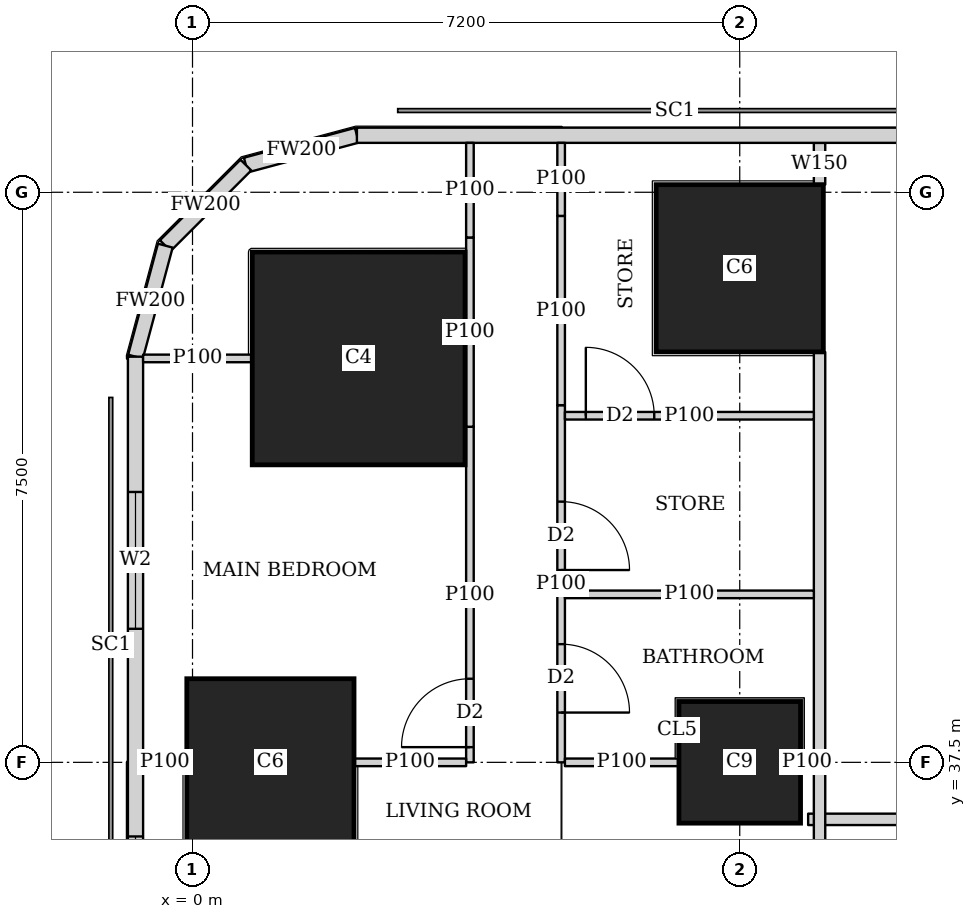
"""IFC4 building model, lengths in metres.
Left out: names, types, materials, properties, quantities, classifications, styles, units other than length and angle.
Written with IfcOpenShell. Run it as: python <this file> out.ifc"""

import sys

from ifc_helpers import new_model, si_unit, direction, frame, frame_2d, origin, origin_2d, place, context, subcontext, project, spatial, rectangle, extrude, element, fill, save


model = new_model("IFC4")
c1 = context("Model", 3, precision=1e-05, world=origin(), true_north=direction((0.0, 1.0)))
c2 = subcontext(c1, "Body", "Model", "MODEL_VIEW")
j1 = project(units=[si_unit("LENGTHUNIT", "METRE"), si_unit("PLANEANGLEUNIT", "RADIAN")], contexts=[c1])
p1 = place(None, origin())
s1 = spatial("IfcSite", under=j1, at=p1, CompositionType="ELEMENT")
p2 = place(p1, origin())
s2 = spatial("IfcBuilding", under=s1, at=p2, CompositionType="ELEMENT")
p3 = place(p2, frame((0.0, 0.0, 100.4)))
s3 = spatial("IfcBuildingStorey", under=s2, at=p3, CompositionType="ELEMENT", Elevation=100.4)
p4 = place(p3, frame((1.025, 37.5, 0.0), z_axis=(0.0, 0.0, 1.0), x_axis=(1.0, 0.0, 0.0)))
e1 = element("IfcColumn", 1, at=p4, inside=s3, PredefinedType="COLUMN", context=c2, shape_type="SweptSolid", body=[
    extrude(rectangle(XDim=2.2, YDim=2.2, at=origin_2d()), origin(), (0.0, 0.0, 1.0), 3.75),
])
p5 = place(p3, frame((7.2, 37.5, 0.0), z_axis=(0.0, 0.0, 1.0), x_axis=(1.0, 0.0, 0.0)))
e2 = element("IfcColumn", 2, at=p5, inside=s3, PredefinedType="COLUMN", context=c2, shape_type="SweptSolid", body=[
    extrude(rectangle(XDim=1.6, YDim=1.6, at=origin_2d()), origin(), (0.0, 0.0, 1.0), 3.75),
])
p6 = place(p3, frame((2.186, 42.814, 0.0), z_axis=(0.0, 0.0, 1.0), x_axis=(1.0, 0.0, 0.0)))
e3 = element("IfcColumn", 3, at=p6, inside=s3, PredefinedType="COLUMN", context=c2, shape_type="SweptSolid", body=[
    extrude(rectangle(XDim=2.8, YDim=2.8, at=origin_2d()), origin(), (0.0, 0.0, 1.0), 3.75),
])
p7 = place(p3, frame((7.2, 44.0, 0.0), z_axis=(0.0, 0.0, 1.0), x_axis=(1.0, 0.0, 0.0)))
e4 = element("IfcColumn", 4, at=p7, inside=s3, PredefinedType="COLUMN", context=c2, shape_type="SweptSolid", body=[
    extrude(rectangle(XDim=2.2, YDim=2.2, at=origin_2d()), origin(), (0.0, 0.0, 1.0), 3.75),
])
p8 = place(p3, frame((40.106, 45.75, 0.0), z_axis=(0.0, 0.0, 1.0), x_axis=(-1.0, 0.0, 0.0)))
e5 = element("IfcWall", 5, at=p8, inside=s3, PredefinedType="SOLIDWALL", context=c2, shape_type="SweptSolid", body=[
    extrude(rectangle(XDim=37.943, YDim=0.2, at=frame_2d((18.971, 0.0))), origin(), (0.0, 0.0, 1.0), 3.5),
])
p9 = place(p8, frame((8.606, 0.0, 0.9)))
e6 = element("IfcOpeningElement", 6, at=p9, cuts=e5, PredefinedType="OPENING", context=c2, shape_type="SweptSolid", body=[
    extrude(rectangle(XDim=1.8, YDim=1.5, at=frame_2d((0.9, 0.75))), frame((0.0, 0.11, 0.0), z_axis=(0.0, -1.0, 0.0), x_axis=(1.0, 0.0, 0.0)), (0.0, 0.0, 1.0), 0.22),
])
p10 = place(p8, frame((12.206, 0.0, 0.9)))
e7 = element("IfcOpeningElement", 7, at=p10, cuts=e5, PredefinedType="OPENING", context=c2, shape_type="SweptSolid", body=[
    extrude(rectangle(XDim=1.8, YDim=1.5, at=frame_2d((0.9, 0.75))), frame((0.0, 0.11, 0.0), z_axis=(0.0, -1.0, 0.0), x_axis=(1.0, 0.0, 0.0)), (0.0, 0.0, 1.0), 0.22),
])
p11 = place(p8, frame((15.806, 0.0, 0.9)))
e8 = element("IfcOpeningElement", 8, at=p11, cuts=e5, PredefinedType="OPENING", context=c2, shape_type="SweptSolid", body=[
    extrude(rectangle(XDim=1.8, YDim=1.5, at=frame_2d((0.9, 0.75))), frame((0.0, 0.11, 0.0), z_axis=(0.0, -1.0, 0.0), x_axis=(1.0, 0.0, 0.0)), (0.0, 0.0, 1.0), 0.22),
])
p12 = place(p8, frame((19.406, 0.0, 0.9)))
e9 = element("IfcOpeningElement", 9, at=p12, cuts=e5, PredefinedType="OPENING", context=c2, shape_type="SweptSolid", body=[
    extrude(rectangle(XDim=1.8, YDim=1.5, at=frame_2d((0.9, 0.75))), frame((0.0, 0.11, 0.0), z_axis=(0.0, -1.0, 0.0), x_axis=(1.0, 0.0, 0.0)), (0.0, 0.0, 1.0), 0.22),
])
p13 = place(p8, frame((23.006, 0.0, 0.9)))
e10 = element("IfcOpeningElement", 10, at=p13, cuts=e5, PredefinedType="OPENING", context=c2, shape_type="SweptSolid", body=[
    extrude(rectangle(XDim=1.8, YDim=1.5, at=frame_2d((0.9, 0.75))), frame((0.0, 0.11, 0.0), z_axis=(0.0, -1.0, 0.0), x_axis=(1.0, 0.0, 0.0)), (0.0, 0.0, 1.0), 0.22),
])
p14 = place(p8, frame((26.606, 0.0, 0.9)))
e11 = element("IfcOpeningElement", 11, at=p14, cuts=e5, PredefinedType="OPENING", context=c2, shape_type="SweptSolid", body=[
    extrude(rectangle(XDim=1.8, YDim=1.5, at=frame_2d((0.9, 0.75))), frame((0.0, 0.11, 0.0), z_axis=(0.0, -1.0, 0.0), x_axis=(1.0, 0.0, 0.0)), (0.0, 0.0, 1.0), 0.22),
])
p15 = place(p3, frame((2.163, 45.75, 0.0), z_axis=(0.0, 0.0, 1.0), x_axis=(-0.965832000415, -0.259168954497, 0.0)))
e12 = element("IfcWall", 12, at=p15, inside=s3, PredefinedType="SOLIDWALL", context=c2, shape_type="SweptSolid", body=[
    extrude(rectangle(XDim=1.513, YDim=0.2, at=frame_2d((0.756, 0.0))), origin(), (0.0, 0.0, 1.0), 3.5),
])
p16 = place(p3, frame((0.702, 45.358, 0.0), z_axis=(0.0, 0.0, 1.0), x_axis=(-0.707106781187, -0.707106781187, 0.0)))
e13 = element("IfcWall", 13, at=p16, inside=s3, PredefinedType="SOLIDWALL", context=c2, shape_type="SweptSolid", body=[
    extrude(rectangle(XDim=1.499, YDim=0.2, at=frame_2d((0.75, 0.0))), origin(), (0.0, 0.0, 1.0), 3.5),
])
p17 = place(p3, frame((-0.358, 44.298, 0.0), z_axis=(0.0, 0.0, 1.0), x_axis=(-0.259168954497, -0.965832000415, 0.0)))
e14 = element("IfcWall", 14, at=p17, inside=s3, PredefinedType="SOLIDWALL", context=c2, shape_type="SweptSolid", body=[
    extrude(rectangle(XDim=1.513, YDim=0.2, at=frame_2d((0.756, 0.0))), origin(), (0.0, 0.0, 1.0), 3.5),
])
p18 = place(p3, frame((-0.75, 42.837, 0.0), z_axis=(0.0, 0.0, 1.0), x_axis=(0.0, -1.0, 0.0)))
e15 = element("IfcWall", 15, at=p18, inside=s3, PredefinedType="SOLIDWALL", context=c2, shape_type="SweptSolid", body=[
    extrude(rectangle(XDim=40.674, YDim=0.2, at=frame_2d((20.337, 0.0))), origin(), (0.0, 0.0, 1.0), 3.5),
])
p19 = place(p18, frame((1.78, 0.0, 0.9)))
e16 = element("IfcOpeningElement", 16, at=p19, cuts=e15, PredefinedType="OPENING", context=c2, shape_type="SweptSolid", body=[
    extrude(rectangle(XDim=1.8, YDim=1.5, at=frame_2d((0.9, 0.75))), frame((0.0, 0.11, 0.0), z_axis=(0.0, -1.0, 0.0), x_axis=(1.0, 0.0, 0.0)), (0.0, 0.0, 1.0), 0.22),
])
p20 = place(p18, frame((6.312, 0.0, 0.9)))
e17 = element("IfcOpeningElement", 17, at=p20, cuts=e15, PredefinedType="OPENING", context=c2, shape_type="SweptSolid", body=[
    extrude(rectangle(XDim=1.8, YDim=1.5, at=frame_2d((0.9, 0.75))), frame((0.0, 0.11, 0.0), z_axis=(0.0, -1.0, 0.0), x_axis=(1.0, 0.0, 0.0)), (0.0, 0.0, 1.0), 0.22),
])
p21 = place(p18, frame((10.062, 0.0, 0.9)))
e18 = element("IfcOpeningElement", 18, at=p21, cuts=e15, PredefinedType="OPENING", context=c2, shape_type="SweptSolid", body=[
    extrude(rectangle(XDim=1.8, YDim=1.5, at=frame_2d((0.9, 0.75))), frame((0.0, 0.11, 0.0), z_axis=(0.0, -1.0, 0.0), x_axis=(1.0, 0.0, 0.0)), (0.0, 0.0, 1.0), 0.22),
])
p22 = place(p18, frame((13.812, 0.0, 0.9)))
e19 = element("IfcOpeningElement", 19, at=p22, cuts=e15, PredefinedType="OPENING", context=c2, shape_type="SweptSolid", body=[
    extrude(rectangle(XDim=1.8, YDim=1.5, at=frame_2d((0.9, 0.75))), frame((0.0, 0.11, 0.0), z_axis=(0.0, -1.0, 0.0), x_axis=(1.0, 0.0, 0.0)), (0.0, 0.0, 1.0), 0.22),
])
p23 = place(p18, frame((17.562, 0.0, 0.9)))
e20 = element("IfcOpeningElement", 20, at=p23, cuts=e15, PredefinedType="OPENING", context=c2, shape_type="SweptSolid", body=[
    extrude(rectangle(XDim=1.8, YDim=1.5, at=frame_2d((0.9, 0.75))), frame((0.0, 0.11, 0.0), z_axis=(0.0, -1.0, 0.0), x_axis=(1.0, 0.0, 0.0)), (0.0, 0.0, 1.0), 0.22),
])
p24 = place(p18, frame((21.312, 0.0, 0.9)))
e21 = element("IfcOpeningElement", 21, at=p24, cuts=e15, PredefinedType="OPENING", context=c2, shape_type="SweptSolid", body=[
    extrude(rectangle(XDim=1.8, YDim=1.5, at=frame_2d((0.9, 0.75))), frame((0.0, 0.11, 0.0), z_axis=(0.0, -1.0, 0.0), x_axis=(1.0, 0.0, 0.0)), (0.0, 0.0, 1.0), 0.22),
])
p25 = place(p18, frame((25.062, 0.0, 0.9)))
e22 = element("IfcOpeningElement", 22, at=p25, cuts=e15, PredefinedType="OPENING", context=c2, shape_type="SweptSolid", body=[
    extrude(rectangle(XDim=1.8, YDim=1.5, at=frame_2d((0.9, 0.75))), frame((0.0, 0.11, 0.0), z_axis=(0.0, -1.0, 0.0), x_axis=(1.0, 0.0, 0.0)), (0.0, 0.0, 1.0), 0.22),
])
p26 = place(p18, frame((28.812, 0.0, 0.9)))
e23 = element("IfcOpeningElement", 23, at=p26, cuts=e15, PredefinedType="OPENING", context=c2, shape_type="SweptSolid", body=[
    extrude(rectangle(XDim=1.8, YDim=1.5, at=frame_2d((0.9, 0.75))), frame((0.0, 0.11, 0.0), z_axis=(0.0, -1.0, 0.0), x_axis=(1.0, 0.0, 0.0)), (0.0, 0.0, 1.0), 0.22),
])
p27 = place(p18, frame((32.562, 0.0, 0.9)))
e24 = element("IfcOpeningElement", 24, at=p27, cuts=e15, PredefinedType="OPENING", context=c2, shape_type="SweptSolid", body=[
    extrude(rectangle(XDim=1.8, YDim=1.5, at=frame_2d((0.9, 0.75))), frame((0.0, 0.11, 0.0), z_axis=(0.0, -1.0, 0.0), x_axis=(1.0, 0.0, 0.0)), (0.0, 0.0, 1.0), 0.22),
])
p28 = place(p18, frame((37.094, 0.0, 0.9)))
e25 = element("IfcOpeningElement", 25, at=p28, cuts=e15, PredefinedType="OPENING", context=c2, shape_type="SweptSolid", body=[
    extrude(rectangle(XDim=1.8, YDim=1.5, at=frame_2d((0.9, 0.75))), frame((0.0, 0.11, 0.0), z_axis=(0.0, -1.0, 0.0), x_axis=(1.0, 0.0, 0.0)), (0.0, 0.0, 1.0), 0.22),
])
p29 = place(p3, frame((8.25, 2.126, 0.0), z_axis=(0.0, 0.0, 1.0), x_axis=(0.0, 1.0, 0.0)))
e26 = element("IfcWall", 26, at=p29, inside=s3, PredefinedType="SOLIDWALL", context=c2, shape_type="SweptSolid", body=[
    extrude(rectangle(XDim=40.773, YDim=0.15, at=frame_2d((20.386, 0.0))), origin(), (0.0, 0.0, 1.0), 3.5),
])
p30 = place(p29, frame((10.286, 0.0, 0.0)))
e27 = element("IfcOpeningElement", 27, at=p30, cuts=e26, PredefinedType="OPENING", context=c2, shape_type="SweptSolid", body=[
    extrude(rectangle(XDim=1.0, YDim=2.1, at=frame_2d((0.5, 1.05))), frame((0.0, 0.085, 0.0), z_axis=(0.0, -1.0, 0.0), x_axis=(1.0, 0.0, 0.0)), (0.0, 0.0, 1.0), 0.17),
])
p31 = place(p29, frame((14.461, 0.0, 0.0)))
e28 = element("IfcOpeningElement", 28, at=p31, cuts=e26, PredefinedType="OPENING", context=c2, shape_type="SweptSolid", body=[
    extrude(rectangle(XDim=1.0, YDim=2.1, at=frame_2d((0.5, 1.05))), frame((0.0, 0.085, 0.0), z_axis=(0.0, -1.0, 0.0), x_axis=(1.0, 0.0, 0.0)), (0.0, 0.0, 1.0), 0.17),
])
p32 = place(p29, frame((25.287, 0.0, 0.0)))
e29 = element("IfcOpeningElement", 29, at=p32, cuts=e26, PredefinedType="OPENING", context=c2, shape_type="SweptSolid", body=[
    extrude(rectangle(XDim=1.0, YDim=2.1, at=frame_2d((0.5, 1.05))), frame((0.0, 0.085, 0.0), z_axis=(0.0, -1.0, 0.0), x_axis=(1.0, 0.0, 0.0)), (0.0, 0.0, 1.0), 0.17),
])
p33 = place(p29, frame((32.787, 0.0, 0.0)))
e30 = element("IfcOpeningElement", 30, at=p33, cuts=e26, PredefinedType="OPENING", context=c2, shape_type="SweptSolid", body=[
    extrude(rectangle(XDim=1.0, YDim=2.1, at=frame_2d((0.5, 1.05))), frame((0.0, 0.085, 0.0), z_axis=(0.0, -1.0, 0.0), x_axis=(1.0, 0.0, 0.0)), (0.0, 0.0, 1.0), 0.17),
])
p34 = place(p3, frame((8.25, 45.101, 0.0), z_axis=(0.0, 0.0, 1.0), x_axis=(0.0, 1.0, 0.0)))
e31 = element("IfcWall", 31, at=p34, inside=s3, PredefinedType="SOLIDWALL", context=c2, shape_type="SweptSolid", body=[
    extrude(rectangle(XDim=0.549, YDim=0.15, at=frame_2d((0.274, 0.0))), origin(), (0.0, 0.0, 1.0), 3.5),
])
p35 = place(p3, frame((8.1, 36.75, 0.0), z_axis=(0.0, 0.0, 1.0), x_axis=(1.0, 0.0, 0.0)))
e32 = element("IfcWall", 32, at=p35, inside=s3, PredefinedType="SOLIDWALL", context=c2, shape_type="SweptSolid", body=[
    extrude(rectangle(XDim=5.499, YDim=0.15, at=frame_2d((2.75, 0.0))), origin(), (0.0, 0.0, 1.0), 3.5),
])
p36 = place(p35, frame((2.725, 0.0, 0.0)))
e33 = element("IfcOpeningElement", 33, at=p36, cuts=e32, PredefinedType="OPENING", context=c2, shape_type="SweptSolid", body=[
    extrude(rectangle(XDim=1.0, YDim=2.1, at=frame_2d((0.5, 1.05))), frame((0.0, 0.085, 0.0), z_axis=(0.0, -1.0, 0.0), x_axis=(1.0, 0.0, 0.0)), (0.0, 0.0, 1.0), 0.17),
])
p37 = place(p3, frame((3.65, 37.5, 0.0), z_axis=(0.0, 0.0, 1.0), x_axis=(0.0, 1.0, 0.0)))
e34 = element("IfcWall", 34, at=p37, inside=s3, PredefinedType="PARTITIONING", context=c2, shape_type="SweptSolid", body=[
    extrude(rectangle(XDim=4.415, YDim=0.1, at=frame_2d((2.208, 0.0))), origin(), (0.0, 0.0, 1.0), 3.5),
])
p38 = place(p37, frame((0.2, 0.0, 0.0)))
e35 = element("IfcOpeningElement", 35, at=p38, cuts=e34, PredefinedType="OPENING", context=c2, shape_type="SweptSolid", body=[
    extrude(rectangle(XDim=0.9, YDim=2.1, at=frame_2d((0.45, 1.05))), frame((0.0, 0.06, 0.0), z_axis=(0.0, -1.0, 0.0), x_axis=(1.0, 0.0, 0.0)), (0.0, 0.0, 1.0), 0.12),
])
p39 = place(p3, frame((3.65, 41.915, 0.0), z_axis=(0.0, 0.0, 1.0), x_axis=(0.0, 1.0, 0.0)))
e36 = element("IfcWall", 36, at=p39, inside=s3, PredefinedType="PARTITIONING", context=c2, shape_type="SweptSolid", body=[
    extrude(rectangle(XDim=2.49, YDim=0.1, at=frame_2d((1.245, 0.0))), origin(), (0.0, 0.0, 1.0), 2.05),
])
p40 = place(p3, frame((3.65, 44.405, 0.0), z_axis=(0.0, 0.0, 1.0), x_axis=(0.0, 1.0, 0.0)))
e37 = element("IfcWall", 37, at=p40, inside=s3, PredefinedType="PARTITIONING", context=c2, shape_type="SweptSolid", body=[
    extrude(rectangle(XDim=1.245, YDim=0.1, at=frame_2d((0.623, 0.0))), origin(), (0.0, 0.0, 1.0), 3.5),
])
p41 = place(p3, frame((4.85, 37.5, 0.0), z_axis=(0.0, 0.0, 1.0), x_axis=(0.0, 1.0, 0.0)))
e38 = element("IfcWall", 38, at=p41, inside=s3, PredefinedType="PARTITIONING", context=c2, shape_type="SweptSolid", body=[
    extrude(rectangle(XDim=4.699, YDim=0.1, at=frame_2d((2.35, 0.0))), origin(), (0.0, 0.0, 1.0), 3.5),
])
p42 = place(p41, frame((0.655, 0.0, 0.0)))
e39 = element("IfcOpeningElement", 39, at=p42, cuts=e38, PredefinedType="OPENING", context=c2, shape_type="SweptSolid", body=[
    extrude(rectangle(XDim=0.9, YDim=2.1, at=frame_2d((0.45, 1.05))), frame((0.0, 0.06, 0.0), z_axis=(0.0, -1.0, 0.0), x_axis=(1.0, 0.0, 0.0)), (0.0, 0.0, 1.0), 0.12),
])
p43 = place(p41, frame((2.53, 0.0, 0.0)))
e40 = element("IfcOpeningElement", 40, at=p43, cuts=e38, PredefinedType="OPENING", context=c2, shape_type="SweptSolid", body=[
    extrude(rectangle(XDim=0.9, YDim=2.1, at=frame_2d((0.45, 1.05))), frame((0.0, 0.06, 0.0), z_axis=(0.0, -1.0, 0.0), x_axis=(1.0, 0.0, 0.0)), (0.0, 0.0, 1.0), 0.12),
])
p44 = place(p3, frame((4.85, 42.199, 0.0), z_axis=(0.0, 0.0, 1.0), x_axis=(0.0, 1.0, 0.0)))
e41 = element("IfcWall", 41, at=p44, inside=s3, PredefinedType="PARTITIONING", context=c2, shape_type="SweptSolid", body=[
    extrude(rectangle(XDim=2.49, YDim=0.1, at=frame_2d((1.245, 0.0))), origin(), (0.0, 0.0, 1.0), 2.05),
])
p45 = place(p3, frame((4.85, 44.689, 0.0), z_axis=(0.0, 0.0, 1.0), x_axis=(0.0, 1.0, 0.0)))
e42 = element("IfcWall", 42, at=p45, inside=s3, PredefinedType="PARTITIONING", context=c2, shape_type="SweptSolid", body=[
    extrude(rectangle(XDim=0.961, YDim=0.1, at=frame_2d((0.48, 0.0))), origin(), (0.0, 0.0, 1.0), 3.5),
])
p46 = place(p3, frame((-0.65, 37.5, 0.0), z_axis=(0.0, 0.0, 1.0), x_axis=(1.0, 0.0, 0.0)))
e43 = element("IfcWall", 43, at=p46, inside=s3, PredefinedType="PARTITIONING", context=c2, shape_type="SweptSolid", body=[
    extrude(rectangle(XDim=0.574, YDim=0.1, at=frame_2d((0.287, 0.0))), origin(), (0.0, 0.0, 1.0), 2.05),
])
p47 = place(p3, frame((2.126, 37.5, 0.0), z_axis=(0.0, 0.0, 1.0), x_axis=(1.0, 0.0, 0.0)))
e44 = element("IfcWall", 44, at=p47, inside=s3, PredefinedType="PARTITIONING", context=c2, shape_type="SweptSolid", body=[
    extrude(rectangle(XDim=1.474, YDim=0.1, at=frame_2d((0.737, 0.0))), origin(), (0.0, 0.0, 1.0), 2.05),
])
p48 = place(p3, frame((-0.65, 42.814, 0.0), z_axis=(0.0, 0.0, 1.0), x_axis=(1.0, 0.0, 0.0)))
e45 = element("IfcWall", 45, at=p48, inside=s3, PredefinedType="PARTITIONING", context=c2, shape_type="SweptSolid", body=[
    extrude(rectangle(XDim=1.435, YDim=0.1, at=frame_2d((0.717, 0.0))), origin(), (0.0, 0.0, 1.0), 3.5),
])
p49 = place(p3, frame((4.9, 37.5, 0.0), z_axis=(0.0, 0.0, 1.0), x_axis=(1.0, 0.0, 0.0)))
e46 = element("IfcWall", 46, at=p49, inside=s3, PredefinedType="PARTITIONING", context=c2, shape_type="SweptSolid", body=[
    extrude(rectangle(XDim=1.499, YDim=0.1, at=frame_2d((0.75, 0.0))), origin(), (0.0, 0.0, 1.0), 3.5),
])
p50 = place(p3, frame((8.001, 37.5, 0.0), z_axis=(0.0, 0.0, 1.0), x_axis=(1.0, 0.0, 0.0)))
e47 = element("IfcWall", 47, at=p50, inside=s3, PredefinedType="PARTITIONING", context=c2, shape_type="SweptSolid", body=[
    extrude(rectangle(XDim=0.174, YDim=0.1, at=frame_2d((0.087, 0.0))), origin(), (0.0, 0.0, 1.0), 3.5),
])
p51 = place(p3, frame((4.9, 39.71, 0.0), z_axis=(0.0, 0.0, 1.0), x_axis=(1.0, 0.0, 0.0)))
e48 = element("IfcWall", 48, at=p51, inside=s3, PredefinedType="PARTITIONING", context=c2, shape_type="SweptSolid", body=[
    extrude(rectangle(XDim=3.275, YDim=0.1, at=frame_2d((1.638, 0.0))), origin(), (0.0, 0.0, 1.0), 3.5),
])
p52 = place(p3, frame((8.175, 42.06, 0.0), z_axis=(0.0, 0.0, 1.0), x_axis=(-1.0, 0.0, 0.0)))
e49 = element("IfcWall", 49, at=p52, inside=s3, PredefinedType="PARTITIONING", context=c2, shape_type="SweptSolid", body=[
    extrude(rectangle(XDim=3.275, YDim=0.1, at=frame_2d((1.638, 0.0))), origin(), (0.0, 0.0, 1.0), 3.5),
])
p53 = place(p52, frame((2.1, 0.0, 0.0)))
e50 = element("IfcOpeningElement", 50, at=p53, cuts=e49, PredefinedType="OPENING", context=c2, shape_type="SweptSolid", body=[
    extrude(rectangle(XDim=0.9, YDim=2.1, at=frame_2d((0.45, 1.05))), frame((0.0, 0.06, 0.0), z_axis=(0.0, -1.0, 0.0), x_axis=(1.0, 0.0, 0.0)), (0.0, 0.0, 1.0), 0.12),
])
p54 = place(p19, origin())
e51 = element("IfcWindow", 51, at=p54, inside=s3, PartitioningType="SINGLE_PANEL", PredefinedType="WINDOW", context=c2, shape_type="SweptSolid", body=[
    extrude(rectangle(XDim=1.8, YDim=1.5, at=frame_2d((0.9, 0.75))), frame((0.0, 0.03, 0.0), z_axis=(0.0, -1.0, 0.0), x_axis=(1.0, 0.0, 0.0)), (0.0, 0.0, 1.0), 0.06),
])
fill(e16, e51)
p55 = place(p20, origin())
e52 = element("IfcWindow", 52, at=p55, inside=s3, PartitioningType="SINGLE_PANEL", PredefinedType="WINDOW", context=c2, shape_type="SweptSolid", body=[
    extrude(rectangle(XDim=1.8, YDim=1.5, at=frame_2d((0.9, 0.75))), frame((0.0, 0.03, 0.0), z_axis=(0.0, -1.0, 0.0), x_axis=(1.0, 0.0, 0.0)), (0.0, 0.0, 1.0), 0.06),
])
fill(e17, e52)
p56 = place(p38, origin())
e53 = element("IfcDoor", 53, at=p56, inside=s3, OperationType="SINGLE_SWING_LEFT", PredefinedType="DOOR", context=c2, shape_type="SweptSolid", body=[
    extrude(rectangle(XDim=0.9, YDim=2.1, at=frame_2d((0.45, 1.05))), frame((0.0, 0.025, 0.0), z_axis=(0.0, -1.0, 0.0), x_axis=(1.0, 0.0, 0.0)), (0.0, 0.0, 1.0), 0.05),
])
fill(e35, e53)
p57 = place(p42, origin())
e54 = element("IfcDoor", 54, at=p57, inside=s3, OperationType="SINGLE_SWING_RIGHT", PredefinedType="DOOR", context=c2, shape_type="SweptSolid", body=[
    extrude(rectangle(XDim=0.9, YDim=2.1, at=frame_2d((0.45, 1.05))), frame((0.0, 0.025, 0.0), z_axis=(0.0, -1.0, 0.0), x_axis=(1.0, 0.0, 0.0)), (0.0, 0.0, 1.0), 0.05),
])
fill(e39, e54)
p58 = place(p43, origin())
e55 = element("IfcDoor", 55, at=p58, inside=s3, OperationType="SINGLE_SWING_RIGHT", PredefinedType="DOOR", context=c2, shape_type="SweptSolid", body=[
    extrude(rectangle(XDim=0.9, YDim=2.1, at=frame_2d((0.45, 1.05))), frame((0.0, 0.025, 0.0), z_axis=(0.0, -1.0, 0.0), x_axis=(1.0, 0.0, 0.0)), (0.0, 0.0, 1.0), 0.05),
])
fill(e40, e55)
p59 = place(p53, origin())
e56 = element("IfcDoor", 56, at=p59, inside=s3, OperationType="SINGLE_SWING_LEFT", PredefinedType="DOOR", context=c2, shape_type="SweptSolid", body=[
    extrude(rectangle(XDim=0.9, YDim=2.1, at=frame_2d((0.45, 1.05))), frame((0.0, 0.025, 0.0), z_axis=(0.0, -1.0, 0.0), x_axis=(1.0, 0.0, 0.0)), (0.0, 0.0, 1.0), 0.05),
])
fill(e50, e56)
save(model, sys.argv[1])
